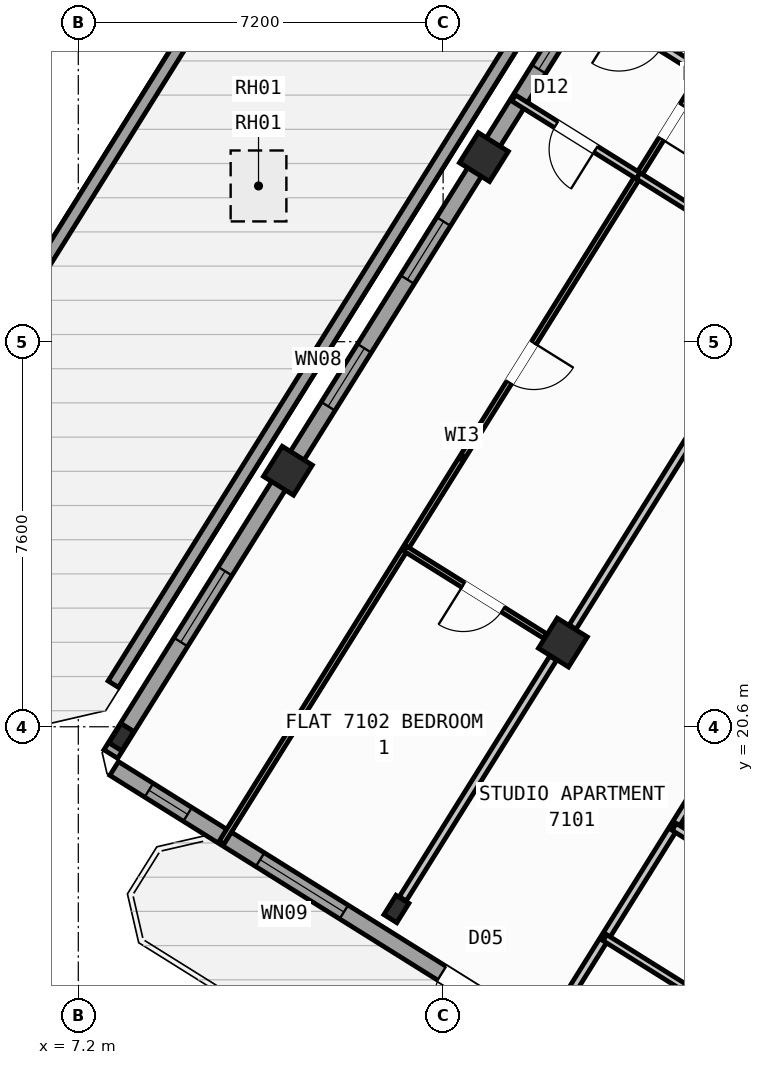
"""IFC4 building model, lengths in metres.
Left out: names, types, materials, properties, quantities, classifications, styles, units other than length and angle.
Written with IfcOpenShell. Run it as: python <this file> out.ifc"""

import sys

from ifc_helpers import new_model, si_unit, direction, frame, frame_2d, origin, origin_2d, place, context, subcontext, project, spatial, rectangle, hollow_rectangle, i_section, extrude, source, transform, mapped, element, fill, save


model = new_model("IFC4")
c1 = context("Model", 3, precision=1e-05, world=origin(), true_north=direction((0.0, 1.0)))
c2 = subcontext(c1, "Body", "Model", "MODEL_VIEW")
j1 = project(units=[si_unit("LENGTHUNIT", "METRE"), si_unit("PLANEANGLEUNIT", "RADIAN")], contexts=[c1])
p1 = place(None, origin())
s1 = spatial("IfcSite", under=j1, at=p1, CompositionType="ELEMENT")
p2 = place(p1, origin())
s2 = spatial("IfcBuilding", under=s1, at=p2, CompositionType="ELEMENT")
p3 = place(p2, frame((0.0, 0.0, 280.8)))
s3 = spatial("IfcBuildingStorey", under=s2, at=p3, CompositionType="ELEMENT", Elevation=280.8)
m1 = source(origin(), c2, "Body", "SweptSolid", [
    extrude(hollow_rectangle(XDim=0.7, YDim=0.7, WallThickness=0.028, at=origin_2d()), origin(), (0.0, 0.0, 1.0), 3.6),
])
p4 = place(p3, frame((16.764, 22.261, 0.0), z_axis=(0.0, 0.0, 1.0), x_axis=(-0.848048096156, 0.529919264233, 0.0)))
e1 = element("IfcColumn", 1, at=p4, inside=s3, PredefinedType="COLUMN", context=c2, shape_type="MappedRepresentation", body=[
    mapped(m1, transform((0.0, 0.0, 0.0), scale=1.0)),
])
m2 = source(origin(), c2, "Body", "SweptSolid", [
    extrude(i_section(OverallWidth=0.3, OverallDepth=0.45, WebThickness=0.014, FlangeThickness=0.026, at=origin_2d()), origin(), (0.0, 0.0, 1.0), 3.6),
])
p5 = place(p3, frame((13.478, 17.003, 0.0), z_axis=(0.0, 0.0, 1.0), x_axis=(-0.848048096156, 0.529919264233, 0.0)))
e2 = element("IfcColumn", 2, at=p5, inside=s3, PredefinedType="COLUMN", context=c2, shape_type="MappedRepresentation", body=[
    mapped(m2, transform((0.0, 0.0, 0.0), scale=1.0)),
])
for number, where, z_axis, x_axis in (
    (3, (15.205, 31.844, 0.0), (0.0, 0.0, 1.0), (-0.848, 0.53, 0.0)),
    (4, (11.336, 25.653, 0.0), (0.0, 0.0, 1.0), (-0.848, 0.53, 0.0)),
):
    element("IfcColumn", number, at=place(p3, frame(where, z_axis=z_axis, x_axis=x_axis)), inside=s3, PredefinedType="COLUMN", context=c2, shape_type="MappedRepresentation", body=[
        mapped(m1, transform((0.0, 0.0, 0.0), scale=1.0)),
    ])
p6 = place(p3, frame((8.051, 20.395, 0.0), z_axis=(0.0, 0.0, 1.0), x_axis=(-0.848048096156, 0.529919264233, 0.0)))
e5 = element("IfcColumn", 5, at=p6, inside=s3, PredefinedType="COLUMN", context=c2, shape_type="MappedRepresentation", body=[
    mapped(m2, transform((0.0, 0.0, 0.0), scale=1.0)),
])
p7 = place(p3, frame((3.451, 24.828, 0.0), z_axis=(0.0, 0.0, 1.0), x_axis=(0.529919162229, 0.848048159895, 0.0)))
e6 = element("IfcWall", 6, at=p7, inside=s3, PredefinedType="PARAPET", context=c2, shape_type="SweptSolid", body=[
    extrude(rectangle(XDim=18.156, YDim=0.24, at=frame_2d((9.078, 0.0))), origin(), (0.0, 0.0, 1.0), 1.15),
])
p8 = place(p3, frame((18.063, 37.72, 0.0), z_axis=(0.0, 0.0, 1.0), x_axis=(-0.529918910732, -0.848048317048, 0.0)))
e7 = element("IfcWall", 7, at=p8, inside=s3, PredefinedType="PARAPET", context=c2, shape_type="SweptSolid", body=[
    extrude(rectangle(XDim=19.196, YDim=0.24, at=frame_2d((9.598, 0.0))), origin(), (0.0, 0.0, 1.0), 1.15),
])
p9 = place(p3, frame((29.268, 6.429, 0.0), z_axis=(0.0, 0.0, 1.0), x_axis=(-0.848048398186, 0.529918780885, 0.0)))
e8 = element("IfcWall", 8, at=p9, inside=s3, PredefinedType="STANDARD", context=c2, shape_type="SweptSolid", body=[
    extrude(rectangle(XDim=25.188, YDim=0.32, at=frame_2d((12.594, 0.0))), origin(), (0.0, 0.0, 1.0), 3.35),
])
p10 = place(p9, frame((16.362, 0.0, 0.0)))
e9 = element("IfcOpeningElement", 9, at=p10, cuts=e8, PredefinedType="OPENING", context=c2, shape_type="SweptSolid", body=[
    extrude(rectangle(XDim=1.2, YDim=2.15, at=frame_2d((0.6, 1.075))), frame((0.0, 0.17, 0.0), z_axis=(0.0, -1.0, 0.0), x_axis=(1.0, 0.0, 0.0)), (0.0, 0.0, 1.0), 0.34),
])
p11 = place(p9, frame((3.859, 0.0, 0.9)))
e10 = element("IfcOpeningElement", 10, at=p11, cuts=e8, PredefinedType="OPENING", context=c2, shape_type="SweptSolid", body=[
    extrude(rectangle(XDim=1.65, YDim=1.45, at=frame_2d((0.825, 0.725))), frame((0.0, 0.17, 0.0), z_axis=(0.0, -1.0, 0.0), x_axis=(1.0, 0.0, 0.0)), (0.0, 0.0, 1.0), 0.34),
])
p12 = place(p9, frame((10.519, 0.0, 0.9)))
e11 = element("IfcOpeningElement", 11, at=p12, cuts=e8, PredefinedType="OPENING", context=c2, shape_type="SweptSolid", body=[
    extrude(rectangle(XDim=1.65, YDim=1.45, at=frame_2d((0.825, 0.725))), frame((0.0, 0.17, 0.0), z_axis=(0.0, -1.0, 0.0), x_axis=(1.0, 0.0, 0.0)), (0.0, 0.0, 1.0), 0.34),
])
p13 = place(p9, frame((19.841, 0.0, 0.95)))
e12 = element("IfcOpeningElement", 12, at=p13, cuts=e8, PredefinedType="OPENING", context=c2, shape_type="SweptSolid", body=[
    extrude(rectangle(XDim=1.95, YDim=1.35, at=frame_2d((0.975, 0.675))), frame((0.0, 0.17, 0.0), z_axis=(0.0, -1.0, 0.0), x_axis=(1.0, 0.0, 0.0)), (0.0, 0.0, 1.0), 0.34),
])
p14 = place(p9, frame((23.478, 0.0, 1.0)))
e13 = element("IfcOpeningElement", 13, at=p14, cuts=e8, PredefinedType="OPENING", context=c2, shape_type="SweptSolid", body=[
    extrude(rectangle(XDim=0.9, YDim=1.25, at=frame_2d((0.45, 0.625))), frame((0.0, 0.17, 0.0), z_axis=(0.0, -1.0, 0.0), x_axis=(1.0, 0.0, 0.0)), (0.0, 0.0, 1.0), 0.34),
])
p15 = place(p3, frame((7.842, 20.061, 0.0), z_axis=(0.0, 0.0, 1.0), x_axis=(0.529915577903, 0.84805039962, 0.0)))
e14 = element("IfcWall", 14, at=p15, inside=s3, PredefinedType="STANDARD", context=c2, shape_type="SweptSolid", body=[
    extrude(rectangle(XDim=21.587, YDim=0.32, at=frame_2d((10.794, 0.0))), origin(), (0.0, 0.0, 1.0), 2.875),
])
p16 = place(p15, frame((2.606, 0.0, 0.9)))
e15 = element("IfcOpeningElement", 15, at=p16, cuts=e14, PredefinedType="OPENING", context=c2, shape_type="SweptSolid", body=[
    extrude(rectangle(XDim=1.65, YDim=1.45, at=frame_2d((0.825, 0.725))), frame((0.0, 0.17, 0.0), z_axis=(0.0, -1.0, 0.0), x_axis=(1.0, 0.0, 0.0)), (0.0, 0.0, 1.0), 0.34),
])
p17 = place(p15, frame((8.094, 0.0, 0.9)))
e16 = element("IfcOpeningElement", 16, at=p17, cuts=e14, PredefinedType="OPENING", context=c2, shape_type="SweptSolid", body=[
    extrude(rectangle(XDim=1.35, YDim=1.45, at=frame_2d((0.675, 0.725))), frame((0.0, 0.17, 0.0), z_axis=(0.0, -1.0, 0.0), x_axis=(1.0, 0.0, 0.0)), (0.0, 0.0, 1.0), 0.34),
])
p18 = place(p15, frame((11.044, 0.0, 0.9)))
e17 = element("IfcOpeningElement", 17, at=p18, cuts=e14, PredefinedType="OPENING", context=c2, shape_type="SweptSolid", body=[
    extrude(rectangle(XDim=1.35, YDim=1.45, at=frame_2d((0.675, 0.725))), frame((0.0, 0.17, 0.0), z_axis=(0.0, -1.0, 0.0), x_axis=(1.0, 0.0, 0.0)), (0.0, 0.0, 1.0), 0.34),
])
p19 = place(p15, frame((15.939, 0.0, 1.0)))
e18 = element("IfcOpeningElement", 18, at=p19, cuts=e14, PredefinedType="OPENING", context=c2, shape_type="SweptSolid", body=[
    extrude(rectangle(XDim=0.9, YDim=1.25, at=frame_2d((0.45, 0.625))), frame((0.0, 0.17, 0.0), z_axis=(0.0, -1.0, 0.0), x_axis=(1.0, 0.0, 0.0)), (0.0, 0.0, 1.0), 0.34),
])
p20 = place(p3, frame((21.206, 17.292, 0.0), z_axis=(0.0, 0.0, 1.0), x_axis=(-0.848050851465, 0.529914854792, 0.0)))
e19 = element("IfcWall", 19, at=p20, inside=s3, PredefinedType="PARTITIONING", context=c2, shape_type="SweptSolid", body=[
    extrude(rectangle(XDim=2.61, YDim=0.16, at=frame_2d((1.305, 0.0))), origin(), (0.0, 0.0, 1.0), 3.34),
])
p21 = place(p3, frame((25.807, 29.582, 0.0), z_axis=(0.0, 0.0, 1.0), x_axis=(-0.529918119251, -0.84804881162, 0.0)))
e20 = element("IfcWall", 20, at=p21, inside=s3, PredefinedType="PARTITIONING", context=c2, shape_type="SweptSolid", body=[
    extrude(rectangle(XDim=17.65, YDim=0.16, at=frame_2d((8.825, 0.0))), origin(), (0.0, 0.0, 1.0), 3.34),
])
p22 = place(p3, frame((26.973, 31.447, 0.0), z_axis=(0.0, 0.0, 1.0), x_axis=(-0.84805406617, 0.529909710094, 0.0)))
e21 = element("IfcWall", 21, at=p22, inside=s3, PredefinedType="PARTITIONING", context=c2, shape_type="SweptSolid", body=[
    extrude(rectangle(XDim=10.33, YDim=0.16, at=frame_2d((5.165, 0.0))), origin(), (0.0, 0.0, 1.0), 3.34),
])
p23 = place(p22, frame((1.459, 0.0, 0.0)))
e22 = element("IfcOpeningElement", 22, at=p23, cuts=e21, PredefinedType="OPENING", context=c2, shape_type="SweptSolid", body=[
    extrude(rectangle(XDim=1.0, YDim=2.1, at=frame_2d((0.5, 1.05))), frame((0.0, 0.09, 0.0), z_axis=(0.0, -1.0, 0.0), x_axis=(1.0, 0.0, 0.0)), (0.0, 0.0, 1.0), 0.18),
])
p24 = place(p22, frame((6.614, 0.0, 0.0)))
e23 = element("IfcOpeningElement", 23, at=p24, cuts=e21, PredefinedType="OPENING", context=c2, shape_type="SweptSolid", body=[
    extrude(rectangle(XDim=1.0, YDim=2.1, at=frame_2d((0.5, 1.05))), frame((0.0, 0.09, 0.0), z_axis=(0.0, -1.0, 0.0), x_axis=(1.0, 0.0, 0.0)), (0.0, 0.0, 1.0), 0.18),
])
p25 = place(p3, frame((25.807, 29.582, 0.0), z_axis=(0.0, 0.0, 1.0), x_axis=(-0.848060702647, 0.529899089097, 0.0)))
e24 = element("IfcWall", 24, at=p25, inside=s3, PredefinedType="PARTITIONING", context=c2, shape_type="SweptSolid", body=[
    extrude(rectangle(XDim=10.33, YDim=0.16, at=frame_2d((5.165, 0.0))), origin(), (0.0, 0.0, 1.0), 3.34),
])
p26 = place(p25, frame((2.22, 0.0, 0.0)))
e25 = element("IfcOpeningElement", 25, at=p26, cuts=e24, PredefinedType="OPENING", context=c2, shape_type="SweptSolid", body=[
    extrude(rectangle(XDim=0.86, YDim=2.05, at=frame_2d((0.43, 1.025))), frame((0.0, 0.09, 0.0), z_axis=(0.0, -1.0, 0.0), x_axis=(1.0, 0.0, 0.0)), (0.0, 0.0, 1.0), 0.18),
])
p27 = place(p25, frame((8.36, 0.0, 0.0)))
e26 = element("IfcOpeningElement", 26, at=p27, cuts=e24, PredefinedType="OPENING", context=c2, shape_type="SweptSolid", body=[
    extrude(rectangle(XDim=1.0, YDim=2.1, at=frame_2d((0.5, 1.05))), frame((0.0, 0.09, 0.0), z_axis=(0.0, -1.0, 0.0), x_axis=(1.0, 0.0, 0.0)), (0.0, 0.0, 1.0), 0.18),
])
p28 = place(p3, frame((20.44, 28.145, 0.0), z_axis=(0.0, 0.0, 1.0), x_axis=(-0.529938869374, -0.84803584519, 0.0)))
e27 = element("IfcWall", 27, at=p28, inside=s3, PredefinedType="PARTITIONING", context=c2, shape_type="SweptSolid", body=[
    extrude(rectangle(XDim=6.576, YDim=0.16, at=frame_2d((3.288, 0.0))), origin(), (0.0, 0.0, 1.0), 2.875),
])
p29 = place(p3, frame((16.572, 21.954, 0.0), z_axis=(0.0, 0.0, 1.0), x_axis=(-0.529904903214, -0.848057069748, 0.0)))
e28 = element("IfcWall", 28, at=p29, inside=s3, PredefinedType="PARTITIONING", context=c2, shape_type="SweptSolid", body=[
    extrude(rectangle(XDim=5.601, YDim=0.16, at=frame_2d((2.801, 0.0))), origin(), (0.0, 0.0, 1.0), 2.875),
])
p30 = place(p3, frame((19.523, 33.508, 0.0), z_axis=(0.0, 0.0, 1.0), x_axis=(-0.529910765222, -0.848053406869, 0.0)))
e29 = element("IfcWall", 29, at=p30, inside=s3, PredefinedType="PARTITIONING", context=c2, shape_type="SweptSolid", body=[
    extrude(rectangle(XDim=17.92, YDim=0.11, at=frame_2d((8.96, 0.0))), origin(), (0.0, 0.0, 1.0), 3.34),
])
p31 = place(p30, frame((0.76, 0.0, 0.0)))
e30 = element("IfcOpeningElement", 30, at=p31, cuts=e29, PredefinedType="OPENING", context=c2, shape_type="SweptSolid", body=[
    extrude(rectangle(XDim=0.78, YDim=2.05, at=frame_2d((0.39, 1.025))), frame((0.0, 0.065, 0.0), z_axis=(0.0, -1.0, 0.0), x_axis=(1.0, 0.0, 0.0)), (0.0, 0.0, 1.0), 0.13),
])
p32 = place(p30, frame((6.289, 0.0, 0.0)))
e31 = element("IfcOpeningElement", 31, at=p32, cuts=e29, PredefinedType="OPENING", context=c2, shape_type="SweptSolid", body=[
    extrude(rectangle(XDim=0.92, YDim=2.08, at=frame_2d((0.46, 1.04))), frame((0.0, 0.065, 0.0), z_axis=(0.0, -1.0, 0.0), x_axis=(1.0, 0.0, 0.0)), (0.0, 0.0, 1.0), 0.13),
])
p33 = place(p3, frame((18.251, 31.473, 0.0), z_axis=(0.0, 0.0, 1.0), x_axis=(-0.848059786386, 0.529900555496, 0.0)))
e32 = element("IfcWall", 32, at=p33, inside=s3, PredefinedType="PLUMBINGWALL", context=c2, shape_type="SweptSolid", body=[
    extrude(rectangle(XDim=2.9, YDim=0.14, at=frame_2d((1.45, 0.0))), origin(), (0.0, 0.0, 1.0), 3.34),
])
p34 = place(p33, frame((0.99, 0.0, 0.0)))
e33 = element("IfcOpeningElement", 33, at=p34, cuts=e32, PredefinedType="OPENING", context=c2, shape_type="SweptSolid", body=[
    extrude(rectangle(XDim=0.92, YDim=2.08, at=frame_2d((0.46, 1.04))), frame((0.0, 0.08, 0.0), z_axis=(0.0, -1.0, 0.0), x_axis=(1.0, 0.0, 0.0)), (0.0, 0.0, 1.0), 0.16),
])
p35 = place(p3, frame((21.321, 29.554, 0.0), z_axis=(0.0, 0.0, 1.0), x_axis=(-0.848021036626, 0.529962566074, 0.0)))
e34 = element("IfcWall", 34, at=p35, inside=s3, PredefinedType="PLUMBINGWALL", context=c2, shape_type="SweptSolid", body=[
    extrude(rectangle(XDim=3.62, YDim=0.14, at=frame_2d((1.81, 0.0))), origin(), (0.0, 0.0, 1.0), 3.34),
])
p36 = place(p3, frame((16.416, 22.388, 0.0), z_axis=(0.0, 0.0, 1.0), x_axis=(-0.84806986598, 0.529884423641, 0.0)))
e35 = element("IfcWall", 35, at=p36, inside=s3, PredefinedType="PARTITIONING", context=c2, shape_type="SweptSolid", body=[
    extrude(rectangle(XDim=3.258, YDim=0.11, at=frame_2d((1.629, 0.0))), origin(), (0.0, 0.0, 1.0), 2.875),
])
p37 = place(p36, frame((0.988, 0.0, 0.0)))
e36 = element("IfcOpeningElement", 36, at=p37, cuts=e35, PredefinedType="OPENING", context=c2, shape_type="SweptSolid", body=[
    extrude(rectangle(XDim=0.92, YDim=2.08, at=frame_2d((0.46, 1.04))), frame((0.0, 0.065, 0.0), z_axis=(0.0, -1.0, 0.0), x_axis=(1.0, 0.0, 0.0)), (0.0, 0.0, 1.0), 0.13),
])
p38 = place(p3, frame((32.164, 10.374, 0.0), z_axis=(0.0, 0.0, 1.0), x_axis=(-0.848044107957, 0.529925646633, 0.0)))
e37 = element("IfcWall", 37, at=p38, inside=s3, PredefinedType="PARTITIONING", context=c2, shape_type="SweptSolid", body=[
    extrude(rectangle(XDim=15.57, YDim=0.16, at=frame_2d((7.785, 0.0))), origin(), (0.0, 0.0, 1.0), 3.34),
])
p39 = place(p38, frame((10.83, 0.0, 0.0)))
e38 = element("IfcOpeningElement", 38, at=p39, cuts=e37, PredefinedType="OPENING", context=c2, shape_type="SweptSolid", body=[
    extrude(rectangle(XDim=1.0, YDim=2.1, at=frame_2d((0.5, 1.05))), frame((0.0, 0.09, 0.0), z_axis=(0.0, -1.0, 0.0), x_axis=(1.0, 0.0, 0.0)), (0.0, 0.0, 1.0), 0.18),
])
p40 = place(p3, frame((29.72, 8.859, 0.0), z_axis=(0.0, 0.0, 1.0), x_axis=(-0.848049134363, 0.529917602752, 0.0)))
e39 = element("IfcWall", 39, at=p40, inside=s3, PredefinedType="PLUMBINGWALL", context=c2, shape_type="SweptSolid", body=[
    extrude(rectangle(XDim=14.3, YDim=0.14, at=frame_2d((7.15, 0.0))), origin(), (0.0, 0.0, 1.0), 3.34),
])
p41 = place(p40, frame((9.57, 0.0, 0.0)))
e40 = element("IfcOpeningElement", 40, at=p41, cuts=e39, PredefinedType="OPENING", context=c2, shape_type="SweptSolid", body=[
    extrude(rectangle(XDim=0.92, YDim=2.08, at=frame_2d((0.46, 1.04))), frame((0.0, 0.08, 0.0), z_axis=(0.0, -1.0, 0.0), x_axis=(1.0, 0.0, 0.0)), (0.0, 0.0, 1.0), 0.16),
])
p42 = place(p3, frame((0.0, 0.0, -0.26)))
p43 = place(p42, frame((10.757, 31.274, 0.0)))
p44 = place(p43, frame((0.0, 0.0, 0.26)))
e41 = element("IfcDoor", 41, at=p44, inside=s3, OperationType="SINGLE_SWING_LEFT", PredefinedType="TRAPDOOR", context=c2, shape_type="SweptSolid", body=[
    extrude(rectangle(XDim=1.1, YDim=1.4, at=origin_2d()), origin(), (0.0, 0.0, 1.0), 0.05),
])
m3 = source(origin(), c2, "Body", "SweptSolid", [
    extrude(rectangle(XDim=1.2, YDim=2.15, at=frame_2d((0.6, 1.075))), frame((0.0, 0.025, 0.0), z_axis=(0.0, -1.0, 0.0), x_axis=(1.0, 0.0, 0.0)), (0.0, 0.0, 1.0), 0.05),
])
p45 = place(p10, origin())
e42 = element("IfcDoor", 42, at=p45, inside=s3, OperationType="SINGLE_SWING_LEFT", PredefinedType="DOOR", context=c2, shape_type="MappedRepresentation", body=[
    mapped(m3, transform((0.0, 0.0, 0.0), scale=1.0)),
])
fill(e9, e42)
m4 = source(origin(), c2, "Body", "SweptSolid", [
    extrude(rectangle(XDim=1.95, YDim=1.35, at=frame_2d((0.975, 0.675))), frame((0.0, 0.03, 0.0), z_axis=(0.0, -1.0, 0.0), x_axis=(1.0, 0.0, 0.0)), (0.0, 0.0, 1.0), 0.06),
])
p46 = place(p13, origin())
e43 = element("IfcWindow", 43, at=p46, inside=s3, PartitioningType="SINGLE_PANEL", PredefinedType="WINDOW", context=c2, shape_type="MappedRepresentation", body=[
    mapped(m4, transform((0.0, 0.0, 0.0), scale=1.0)),
])
fill(e12, e43)
m5 = source(origin(), c2, "Body", "SweptSolid", [
    extrude(rectangle(XDim=0.9, YDim=1.25, at=frame_2d((0.45, 0.625))), frame((0.0, 0.03, 0.0), z_axis=(0.0, -1.0, 0.0), x_axis=(1.0, 0.0, 0.0)), (0.0, 0.0, 1.0), 0.06),
])
p47 = place(p14, origin())
e44 = element("IfcWindow", 44, at=p47, inside=s3, PartitioningType="SINGLE_PANEL", PredefinedType="WINDOW", context=c2, shape_type="MappedRepresentation", body=[
    mapped(m5, transform((0.0, 0.0, 0.0), scale=1.0)),
])
fill(e13, e44)
m6 = source(origin(), c2, "Body", "SweptSolid", [
    extrude(rectangle(XDim=1.65, YDim=1.45, at=frame_2d((0.825, 0.725))), frame((0.0, 0.03, 0.0), z_axis=(0.0, -1.0, 0.0), x_axis=(1.0, 0.0, 0.0)), (0.0, 0.0, 1.0), 0.06),
])
p48 = place(p16, origin())
e45 = element("IfcWindow", 45, at=p48, inside=s3, PartitioningType="SINGLE_PANEL", PredefinedType="WINDOW", context=c2, shape_type="MappedRepresentation", body=[
    mapped(m6, transform((0.0, 0.0, 0.0), scale=1.0)),
])
fill(e15, e45)
m7 = source(origin(), c2, "Body", "SweptSolid", [
    extrude(rectangle(XDim=1.35, YDim=1.45, at=frame_2d((0.675, 0.725))), frame((0.0, 0.03, 0.0), z_axis=(0.0, -1.0, 0.0), x_axis=(1.0, 0.0, 0.0)), (0.0, 0.0, 1.0), 0.06),
])
p49 = place(p17, origin())
e46 = element("IfcWindow", 46, at=p49, inside=s3, PartitioningType="SINGLE_PANEL", PredefinedType="WINDOW", context=c2, shape_type="MappedRepresentation", body=[
    mapped(m7, transform((0.0, 0.0, 0.0), scale=1.0)),
])
fill(e16, e46)
p50 = place(p18, origin())
e47 = element("IfcWindow", 47, at=p50, inside=s3, PartitioningType="SINGLE_PANEL", PredefinedType="WINDOW", context=c2, shape_type="MappedRepresentation", body=[
    mapped(m7, transform((0.0, 0.0, 0.0), scale=1.0)),
])
fill(e17, e47)
p51 = place(p19, origin())
e48 = element("IfcWindow", 48, at=p51, inside=s3, PartitioningType="SINGLE_PANEL", PredefinedType="WINDOW", context=c2, shape_type="MappedRepresentation", body=[
    mapped(m5, transform((0.0, 0.0, 0.0), scale=1.0)),
])
fill(e18, e48)
m8 = source(origin(), c2, "Body", "SweptSolid", [
    extrude(rectangle(XDim=0.92, YDim=2.08, at=frame_2d((0.46, 1.04))), frame((0.0, 0.025, 0.0), z_axis=(0.0, -1.0, 0.0), x_axis=(1.0, 0.0, 0.0)), (0.0, 0.0, 1.0), 0.05),
])
p52 = place(p34, origin())
e49 = element("IfcDoor", 49, at=p52, inside=s3, OperationType="SINGLE_SWING_LEFT", PredefinedType="DOOR", context=c2, shape_type="MappedRepresentation", body=[
    mapped(m8, transform((0.0, 0.0, 0.0), scale=1.0)),
])
fill(e33, e49)
m9 = source(origin(), c2, "Body", "SweptSolid", [
    extrude(rectangle(XDim=0.78, YDim=2.05, at=frame_2d((0.39, 1.025))), frame((0.0, 0.025, 0.0), z_axis=(0.0, -1.0, 0.0), x_axis=(1.0, 0.0, 0.0)), (0.0, 0.0, 1.0), 0.05),
])
p53 = place(p31, origin())
e50 = element("IfcDoor", 50, at=p53, inside=s3, OperationType="SINGLE_SWING_RIGHT", PredefinedType="DOOR", context=c2, shape_type="MappedRepresentation", body=[
    mapped(m9, transform((0.0, 0.0, 0.0), scale=1.0)),
])
fill(e30, e50)
p54 = place(p32, origin())
e51 = element("IfcDoor", 51, at=p54, inside=s3, OperationType="SINGLE_SWING_LEFT", PredefinedType="DOOR", context=c2, shape_type="MappedRepresentation", body=[
    mapped(m8, transform((0.0, 0.0, 0.0), scale=1.0)),
])
fill(e31, e51)
p55 = place(p37, origin())
e52 = element("IfcDoor", 52, at=p55, inside=s3, OperationType="SINGLE_SWING_RIGHT", PredefinedType="DOOR", context=c2, shape_type="MappedRepresentation", body=[
    mapped(m8, transform((0.0, 0.0, 0.0), scale=1.0)),
])
fill(e36, e52)
save(model, sys.argv[1])
